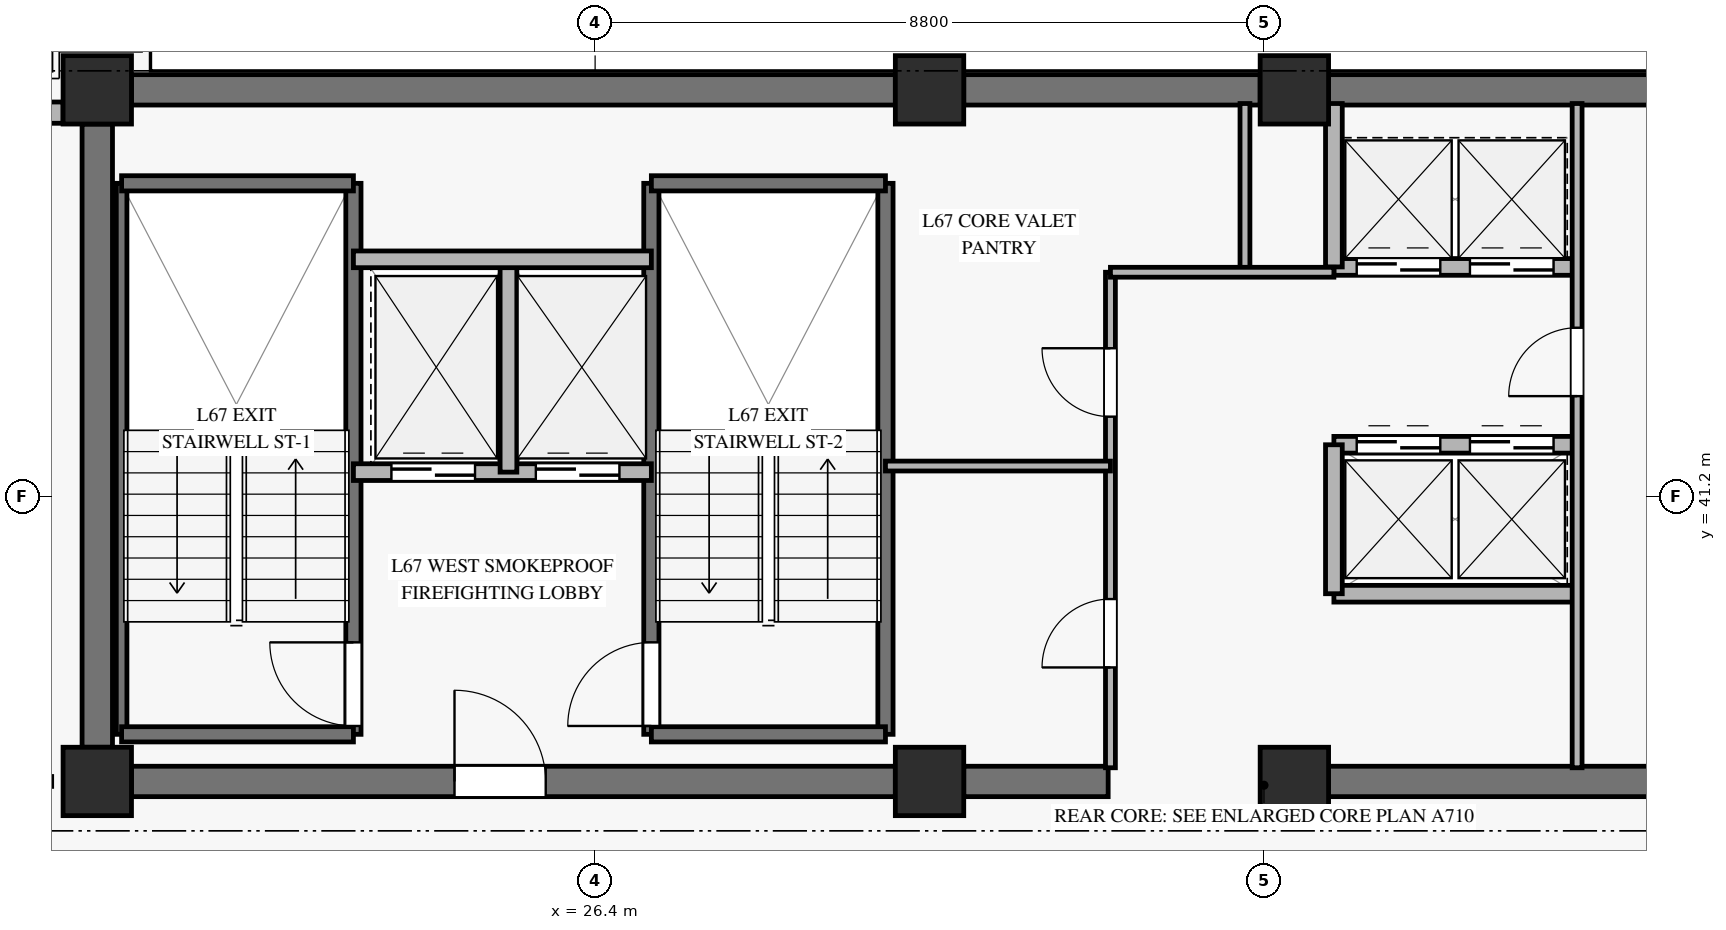
"""IFC4 building model, lengths in metres.
Left out: names, types, materials, properties, quantities, classifications, styles, units other than length and angle.
Written with IfcOpenShell. Run it as: python <this file> out.ifc"""

import sys

from ifc_helpers import new_model, si_unit, direction, frame, frame_2d, origin, origin_2d, place, context, subcontext, project, spatial, rectangle, extrude, source, transform, mapped, element, fill, save


model = new_model("IFC4")
c1 = context("Model", 3, precision=1e-05, world=origin(), true_north=direction((0.0, 1.0)))
c2 = subcontext(c1, "Body", "Model", "MODEL_VIEW")
j1 = project(units=[si_unit("LENGTHUNIT", "METRE"), si_unit("PLANEANGLEUNIT", "RADIAN")], contexts=[c1])
p1 = place(None, origin())
s1 = spatial("IfcSite", under=j1, at=p1, CompositionType="ELEMENT")
p2 = place(p1, origin())
s2 = spatial("IfcBuilding", under=s1, at=p2, CompositionType="ELEMENT")
p3 = place(p2, frame((0.0, 0.0, 262.1)))
s3 = spatial("IfcBuildingStorey", under=s2, at=p3, CompositionType="ELEMENT", Elevation=262.1)
m1 = source(origin(), c2, "Body", "SweptSolid", [
    extrude(rectangle(XDim=0.9, YDim=0.9, at=origin_2d()), origin(), (0.0, 0.0, 1.0), 3.185),
])
for number, where, z_axis, x_axis in (
    (1, (19.85, 37.45, 0.0), (0.0, 0.0, 1.0), (1.0, 0.0, 0.0)),
    (2, (19.85, 46.55, 0.0), (0.0, 0.0, 1.0), (1.0, 0.0, 0.0)),
    (3, (30.8, 37.45, 0.0), (0.0, 0.0, 1.0), (1.0, 0.0, 0.0)),
    (4, (30.8, 46.55, 0.0), (0.0, 0.0, 1.0), (1.0, 0.0, 0.0)),
    (5, (35.6, 37.45, 0.0), (0.0, 0.0, 1.0), (1.0, 0.0, 0.0)),
    (6, (35.6, 46.55, 0.0), (0.0, 0.0, 1.0), (1.0, 0.0, 0.0)),
):
    element("IfcColumn", number, at=place(p3, frame(where, z_axis=z_axis, x_axis=x_axis)), inside=s3, PredefinedType="PILASTER", context=c2, shape_type="MappedRepresentation", body=[
        mapped(m1, transform((0.0, 0.0, 0.0), x_axis=(1.0, 0.0, 0.0), y_axis=(0.0, 1.0, 0.0), z_axis=(0.0, 0.0, 1.0), scale=1.0)),
    ])
p4 = place(p3, frame((20.3, 46.55, 0.0), z_axis=(0.0, 0.0, 1.0), x_axis=(1.0, 0.0, 0.0)))
e7 = element("IfcWall", 7, at=p4, inside=s3, PredefinedType="SHEAR", context=c2, shape_type="SweptSolid", body=[
    extrude(rectangle(XDim=10.05, YDim=0.4, at=frame_2d((5.025, 0.0))), origin(), (0.0, 0.0, 1.0), 3.185),
])
p5 = place(p3, frame((31.25, 46.55, 0.0), z_axis=(0.0, 0.0, 1.0), x_axis=(1.0, 0.0, 0.0)))
e8 = element("IfcWall", 8, at=p5, inside=s3, PredefinedType="SHEAR", context=c2, shape_type="SweptSolid", body=[
    extrude(rectangle(XDim=3.9, YDim=0.4, at=frame_2d((1.95, 0.0))), origin(), (0.0, 0.0, 1.0), 3.185),
])
p6 = place(p3, frame((36.05, 46.55, 0.0), z_axis=(0.0, 0.0, 1.0), x_axis=(1.0, 0.0, 0.0)))
e9 = element("IfcWall", 9, at=p6, inside=s3, PredefinedType="SHEAR", context=c2, shape_type="SweptSolid", body=[
    extrude(rectangle(XDim=7.8, YDim=0.4, at=frame_2d((3.9, 0.0))), origin(), (0.0, 0.0, 1.0), 3.185),
])
p7 = place(p3, frame((20.3, 37.45, 0.0), z_axis=(0.0, 0.0, 1.0), x_axis=(1.0, 0.0, 0.0)))
e10 = element("IfcWall", 10, at=p7, inside=s3, PredefinedType="SHEAR", context=c2, shape_type="SweptSolid", body=[
    extrude(rectangle(XDim=10.05, YDim=0.4, at=frame_2d((5.025, 0.0))), origin(), (0.0, 0.0, 1.0), 3.185),
])
p8 = place(p7, frame((4.25, 0.0, 0.0)))
e11 = element("IfcOpeningElement", 11, at=p8, cuts=e10, PredefinedType="OPENING", context=c2, shape_type="SweptSolid", body=[
    extrude(rectangle(XDim=1.2, YDim=2.15, at=frame_2d((0.6, 1.075))), frame((0.0, 0.21, 0.0), z_axis=(0.0, -1.0, 0.0), x_axis=(1.0, 0.0, 0.0)), (0.0, 0.0, 1.0), 0.42),
])
p9 = place(p3, frame((31.25, 37.45, 0.0), z_axis=(0.0, 0.0, 1.0), x_axis=(1.0, 0.0, 0.0)))
e12 = element("IfcWall", 12, at=p9, inside=s3, PredefinedType="SHEAR", context=c2, shape_type="SweptSolid", body=[
    extrude(rectangle(XDim=1.9, YDim=0.4, at=frame_2d((0.95, 0.0))), origin(), (0.0, 0.0, 1.0), 3.185),
])
p10 = place(p3, frame((36.05, 37.45, 0.0), z_axis=(0.0, 0.0, 1.0), x_axis=(1.0, 0.0, 0.0)))
e13 = element("IfcWall", 13, at=p10, inside=s3, PredefinedType="SHEAR", context=c2, shape_type="SweptSolid", body=[
    extrude(rectangle(XDim=7.8, YDim=0.4, at=frame_2d((3.9, 0.0))), origin(), (0.0, 0.0, 1.0), 3.185),
])
p11 = place(p3, frame((19.85, 37.9, 0.0), z_axis=(0.0, 0.0, 1.0), x_axis=(0.0, 1.0, 0.0)))
e14 = element("IfcWall", 14, at=p11, inside=s3, PredefinedType="SHEAR", context=c2, shape_type="SweptSolid", body=[
    extrude(rectangle(XDim=8.2, YDim=0.4, at=frame_2d((4.1, 0.0))), origin(), (0.0, 0.0, 1.0), 3.185),
])
p12 = place(p3, frame((11.598, 46.25, 0.0), z_axis=(0.0, 0.0, 1.0), x_axis=(1.0, 0.0, 0.0)))
e15 = element("IfcWall", 15, at=p12, inside=s3, PredefinedType="SOLIDWALL", context=c2, shape_type="SweptSolid", body=[
    extrude(rectangle(XDim=7.802, YDim=0.28, at=frame_2d((3.901, 0.0))), origin(), (0.0, 0.0, 1.0), 2.815),
])
p13 = place(p12, frame((3.101, 0.0, 0.45)))
e16 = element("IfcOpeningElement", 16, at=p13, cuts=e15, PredefinedType="OPENING", context=c2, shape_type="SweptSolid", body=[
    extrude(rectangle(XDim=1.6, YDim=2.0, at=frame_2d((0.8, 1.0))), frame((0.0, 0.15, 0.0), z_axis=(0.0, -1.0, 0.0), x_axis=(1.0, 0.0, 0.0)), (0.0, 0.0, 1.0), 0.3),
])
p14 = place(p3, frame((20.17, 38.07, 0.0), z_axis=(0.0, 0.0, 1.0), x_axis=(0.0, 1.0, 0.0)))
e17 = element("IfcWall", 17, at=p14, inside=s3, PredefinedType="SOLIDWALL", context=c2, shape_type="SweptSolid", body=[
    extrude(rectangle(XDim=7.25, YDim=0.14, at=frame_2d((3.625, 0.0))), origin(), (0.0, 0.0, 1.0), 3.4),
])
p15 = place(p3, frame((23.22, 38.07, 0.0), z_axis=(0.0, 0.0, 1.0), x_axis=(0.0, 1.0, 0.0)))
e18 = element("IfcWall", 18, at=p15, inside=s3, PredefinedType="SOLIDWALL", context=c2, shape_type="SweptSolid", body=[
    extrude(rectangle(XDim=7.25, YDim=0.2, at=frame_2d((3.625, 0.0))), origin(), (0.0, 0.0, 1.0), 3.4),
])
p16 = place(p15, frame((0.11, 0.0, 0.0)))
e19 = element("IfcOpeningElement", 19, at=p16, cuts=e18, PredefinedType="OPENING", context=c2, shape_type="SweptSolid", body=[
    extrude(rectangle(XDim=1.1, YDim=2.15, at=frame_2d((0.55, 1.075))), frame((0.0, 0.11, 0.0), z_axis=(0.0, -1.0, 0.0), x_axis=(1.0, 0.0, 0.0)), (0.0, 0.0, 1.0), 0.22),
])
for number, where, z_axis, x_axis in (
    (20, (20.17, 45.32, 0.0), (0.0, 0.0, 1.0), (1.0, 0.0, 0.0)),
    (21, (20.17, 38.07, 0.0), (0.0, 0.0, 1.0), (1.0, 0.0, 0.0)),
):
    element("IfcWall", number, at=place(p3, frame(where, z_axis=z_axis, x_axis=x_axis)), inside=s3, PredefinedType="SOLIDWALL", context=c2, shape_type="SweptSolid", body=[
        extrude(rectangle(XDim=3.05, YDim=0.2, at=frame_2d((1.525, 0.0))), origin(), (0.0, 0.0, 1.0), 3.4),
    ])
p17 = place(p3, frame((27.14, 38.07, 0.0), z_axis=(0.0, 0.0, 1.0), x_axis=(0.0, 1.0, 0.0)))
e22 = element("IfcWall", 22, at=p17, inside=s3, PredefinedType="SOLIDWALL", context=c2, shape_type="SweptSolid", body=[
    extrude(rectangle(XDim=7.25, YDim=0.2, at=frame_2d((3.625, 0.0))), origin(), (0.0, 0.0, 1.0), 3.4),
])
p18 = place(p17, frame((0.11, 0.0, 0.0)))
e23 = element("IfcOpeningElement", 23, at=p18, cuts=e22, PredefinedType="OPENING", context=c2, shape_type="SweptSolid", body=[
    extrude(rectangle(XDim=1.1, YDim=2.15, at=frame_2d((0.55, 1.075))), frame((0.0, 0.11, 0.0), z_axis=(0.0, -1.0, 0.0), x_axis=(1.0, 0.0, 0.0)), (0.0, 0.0, 1.0), 0.22),
])
p19 = place(p3, frame((30.22, 38.07, 0.0), z_axis=(0.0, 0.0, 1.0), x_axis=(0.0, 1.0, 0.0)))
e24 = element("IfcWall", 24, at=p19, inside=s3, PredefinedType="SOLIDWALL", context=c2, shape_type="SweptSolid", body=[
    extrude(rectangle(XDim=7.25, YDim=0.2, at=frame_2d((3.625, 0.0))), origin(), (0.0, 0.0, 1.0), 3.4),
])
for number, where, z_axis, x_axis in (
    (25, (27.14, 45.32, 0.0), (0.0, 0.0, 1.0), (1.0, 0.0, 0.0)),
    (26, (27.14, 38.07, 0.0), (0.0, 0.0, 1.0), (1.0, 0.0, 0.0)),
):
    element("IfcWall", number, at=place(p3, frame(where, z_axis=z_axis, x_axis=x_axis)), inside=s3, PredefinedType="SOLIDWALL", context=c2, shape_type="SweptSolid", body=[
        extrude(rectangle(XDim=3.08, YDim=0.2, at=frame_2d((1.54, 0.0))), origin(), (0.0, 0.0, 1.0), 3.4),
    ])
p20 = place(p3, frame((23.22, 41.52, 0.0), z_axis=(0.0, 0.0, 1.0), x_axis=(1.0, 0.0, 0.0)))
e27 = element("IfcWall", 27, at=p20, inside=s3, PredefinedType="SOLIDWALL", context=c2, shape_type="SweptSolid", body=[
    extrude(rectangle(XDim=3.92, YDim=0.22, at=frame_2d((1.96, 0.0))), origin(), (0.0, 0.0, 1.0), 3.185),
])
p21 = place(p20, frame((0.5, 0.0, 0.0)))
e28 = element("IfcOpeningElement", 28, at=p21, cuts=e27, PredefinedType="OPENING", context=c2, shape_type="SweptSolid", body=[
    extrude(rectangle(XDim=1.1, YDim=2.2, at=frame_2d((0.55, 1.1))), frame((0.0, 0.12, 0.0), z_axis=(0.0, -1.0, 0.0), x_axis=(1.0, 0.0, 0.0)), (0.0, 0.0, 1.0), 0.24),
])
p22 = place(p20, frame((2.4, 0.0, 0.0)))
e29 = element("IfcOpeningElement", 29, at=p22, cuts=e27, PredefinedType="OPENING", context=c2, shape_type="SweptSolid", body=[
    extrude(rectangle(XDim=1.1, YDim=2.2, at=frame_2d((0.55, 1.1))), frame((0.0, 0.12, 0.0), z_axis=(0.0, -1.0, 0.0), x_axis=(1.0, 0.0, 0.0)), (0.0, 0.0, 1.0), 0.24),
])
p23 = place(p3, frame((25.26, 41.52, 0.0), z_axis=(0.0, 0.0, 1.0), x_axis=(0.0, 1.0, 0.0)))
e30 = element("IfcWall", 30, at=p23, inside=s3, PredefinedType="SOLIDWALL", context=c2, shape_type="SweptSolid", body=[
    extrude(rectangle(XDim=2.8, YDim=0.22, at=frame_2d((1.4, 0.0))), origin(), (0.0, 0.0, 1.0), 3.185),
])
p24 = place(p3, frame((23.22, 44.32, 0.0), z_axis=(0.0, 0.0, 1.0), x_axis=(1.0, 0.0, 0.0)))
e31 = element("IfcWall", 31, at=p24, inside=s3, PredefinedType="SOLIDWALL", context=c2, shape_type="SweptSolid", body=[
    extrude(rectangle(XDim=3.92, YDim=0.22, at=frame_2d((1.96, 0.0))), origin(), (0.0, 0.0, 1.0), 3.185),
])
p25 = place(p3, frame((36.12, 44.22, 0.0), z_axis=(0.0, 0.0, 1.0), x_axis=(1.0, 0.0, 0.0)))
e32 = element("IfcWall", 32, at=p25, inside=s3, PredefinedType="SOLIDWALL", context=c2, shape_type="SweptSolid", body=[
    extrude(rectangle(XDim=3.2, YDim=0.22, at=frame_2d((1.6, 0.0))), origin(), (0.0, 0.0, 1.0), 3.185),
])
p26 = place(p25, frame((0.3, 0.0, 0.0)))
e33 = element("IfcOpeningElement", 33, at=p26, cuts=e32, PredefinedType="OPENING", context=c2, shape_type="SweptSolid", body=[
    extrude(rectangle(XDim=1.1, YDim=2.2, at=frame_2d((0.55, 1.1))), frame((0.0, 0.12, 0.0), z_axis=(0.0, -1.0, 0.0), x_axis=(1.0, 0.0, 0.0)), (0.0, 0.0, 1.0), 0.24),
])
p27 = place(p25, frame((1.79, 0.0, 0.0)))
e34 = element("IfcOpeningElement", 34, at=p27, cuts=e32, PredefinedType="OPENING", context=c2, shape_type="SweptSolid", body=[
    extrude(rectangle(XDim=1.1, YDim=2.2, at=frame_2d((0.55, 1.1))), frame((0.0, 0.12, 0.0), z_axis=(0.0, -1.0, 0.0), x_axis=(1.0, 0.0, 0.0)), (0.0, 0.0, 1.0), 0.24),
])
p28 = place(p3, frame((36.12, 41.88, 0.0), z_axis=(0.0, 0.0, 1.0), x_axis=(1.0, 0.0, 0.0)))
e35 = element("IfcWall", 35, at=p28, inside=s3, PredefinedType="SOLIDWALL", context=c2, shape_type="SweptSolid", body=[
    extrude(rectangle(XDim=3.2, YDim=0.22, at=frame_2d((1.6, 0.0))), origin(), (0.0, 0.0, 1.0), 3.185),
])
p29 = place(p28, frame((0.3, 0.0, 0.0)))
e36 = element("IfcOpeningElement", 36, at=p29, cuts=e35, PredefinedType="OPENING", context=c2, shape_type="SweptSolid", body=[
    extrude(rectangle(XDim=1.1, YDim=2.2, at=frame_2d((0.55, 1.1))), frame((0.0, 0.12, 0.0), z_axis=(0.0, -1.0, 0.0), x_axis=(1.0, 0.0, 0.0)), (0.0, 0.0, 1.0), 0.24),
])
p30 = place(p28, frame((1.79, 0.0, 0.0)))
e37 = element("IfcOpeningElement", 37, at=p30, cuts=e35, PredefinedType="OPENING", context=c2, shape_type="SweptSolid", body=[
    extrude(rectangle(XDim=1.1, YDim=2.2, at=frame_2d((0.55, 1.1))), frame((0.0, 0.12, 0.0), z_axis=(0.0, -1.0, 0.0), x_axis=(1.0, 0.0, 0.0)), (0.0, 0.0, 1.0), 0.24),
])
p31 = place(p3, frame((36.12, 39.92, 0.0), z_axis=(0.0, 0.0, 1.0), x_axis=(1.0, 0.0, 0.0)))
e38 = element("IfcWall", 38, at=p31, inside=s3, PredefinedType="SOLIDWALL", context=c2, shape_type="SweptSolid", body=[
    extrude(rectangle(XDim=3.2, YDim=0.22, at=frame_2d((1.6, 0.0))), origin(), (0.0, 0.0, 1.0), 3.185),
])
p32 = place(p3, frame((36.12, 39.92, 0.0), z_axis=(0.0, 0.0, 1.0), x_axis=(0.0, 1.0, 0.0)))
e39 = element("IfcWall", 39, at=p32, inside=s3, PredefinedType="SOLIDWALL", context=c2, shape_type="SweptSolid", body=[
    extrude(rectangle(XDim=1.96, YDim=0.22, at=frame_2d((0.98, 0.0))), origin(), (0.0, 0.0, 1.0), 3.185),
])
p33 = place(p3, frame((36.12, 44.22, 0.0), z_axis=(0.0, 0.0, 1.0), x_axis=(0.0, 1.0, 0.0)))
e40 = element("IfcWall", 40, at=p33, inside=s3, PredefinedType="SOLIDWALL", context=c2, shape_type="SweptSolid", body=[
    extrude(rectangle(XDim=2.15, YDim=0.22, at=frame_2d((1.075, 0.0))), origin(), (0.0, 0.0, 1.0), 3.185),
])
p34 = place(p3, frame((33.18, 37.63, 0.0), z_axis=(0.0, 0.0, 1.0), x_axis=(0.0, 1.0, 0.0)))
e41 = element("IfcWall", 41, at=p34, inside=s3, PredefinedType="PARTITIONING", context=c2, shape_type="SweptSolid", body=[
    extrude(rectangle(XDim=6.52, YDim=0.13, at=frame_2d((3.26, 0.0))), origin(), (0.0, 0.0, 1.0), 2.27),
])
p35 = place(p34, frame((1.32, 0.0, 0.0)))
e42 = element("IfcOpeningElement", 42, at=p35, cuts=e41, PredefinedType="OPENING", context=c2, shape_type="SweptSolid", body=[
    extrude(rectangle(XDim=0.9, YDim=2.1, at=frame_2d((0.45, 1.05))), frame((0.0, 0.075, 0.0), z_axis=(0.0, -1.0, 0.0), x_axis=(1.0, 0.0, 0.0)), (0.0, 0.0, 1.0), 0.15),
])
p36 = place(p34, frame((4.62, 0.0, 0.0)))
e43 = element("IfcOpeningElement", 43, at=p36, cuts=e41, PredefinedType="OPENING", context=c2, shape_type="SweptSolid", body=[
    extrude(rectangle(XDim=0.9, YDim=2.1, at=frame_2d((0.45, 1.05))), frame((0.0, 0.075, 0.0), z_axis=(0.0, -1.0, 0.0), x_axis=(1.0, 0.0, 0.0)), (0.0, 0.0, 1.0), 0.15),
])
p37 = place(p3, frame((34.95, 44.15, 0.0), z_axis=(0.0, 0.0, 1.0), x_axis=(0.0, 1.0, 0.0)))
e44 = element("IfcWall", 44, at=p37, inside=s3, PredefinedType="PARTITIONING", context=c2, shape_type="SweptSolid", body=[
    extrude(rectangle(XDim=2.22, YDim=0.13, at=frame_2d((1.11, 0.0))), origin(), (0.0, 0.0, 1.0), 3.185),
])
p38 = place(p3, frame((33.18, 44.15, 0.0), z_axis=(0.0, 0.0, 1.0), x_axis=(1.0, 0.0, 0.0)))
e45 = element("IfcWall", 45, at=p38, inside=s3, PredefinedType="PARTITIONING", context=c2, shape_type="SweptSolid", body=[
    extrude(rectangle(XDim=2.94, YDim=0.13, at=frame_2d((1.47, 0.0))), origin(), (0.0, 0.0, 1.0), 2.47),
])
p39 = place(p3, frame((39.32, 37.63, 0.0), z_axis=(0.0, 0.0, 1.0), x_axis=(0.0, 1.0, 0.0)))
e46 = element("IfcWall", 46, at=p39, inside=s3, PredefinedType="PARTITIONING", context=c2, shape_type="SweptSolid", body=[
    extrude(rectangle(XDim=8.74, YDim=0.13, at=frame_2d((4.37, 0.0))), origin(), (0.0, 0.0, 1.0), 3.185),
])
p40 = place(p39, frame((4.89, 0.0, 0.0)))
e47 = element("IfcOpeningElement", 47, at=p40, cuts=e46, PredefinedType="OPENING", context=c2, shape_type="SweptSolid", body=[
    extrude(rectangle(XDim=0.9, YDim=2.1, at=frame_2d((0.45, 1.05))), frame((0.0, 0.075, 0.0), z_axis=(0.0, -1.0, 0.0), x_axis=(1.0, 0.0, 0.0)), (0.0, 0.0, 1.0), 0.15),
])
p41 = place(p3, frame((30.22, 41.6, 0.0), z_axis=(0.0, 0.0, 1.0), x_axis=(1.0, 0.0, 0.0)))
e48 = element("IfcWall", 48, at=p41, inside=s3, PredefinedType="PARTITIONING", context=c2, shape_type="SweptSolid", body=[
    extrude(rectangle(XDim=2.96, YDim=0.13, at=frame_2d((1.48, 0.0))), origin(), (0.0, 0.0, 1.0), 2.47),
])
m2 = source(origin(), c2, "Body", "SweptSolid", [
    extrude(rectangle(XDim=1.1, YDim=2.15, at=frame_2d((0.55, 1.075))), frame((0.0, 0.025, 0.0), z_axis=(0.0, -1.0, 0.0), x_axis=(1.0, 0.0, 0.0)), (0.0, 0.0, 1.0), 0.05),
])
p42 = place(p16, origin())
e49 = element("IfcDoor", 49, at=p42, inside=s3, OperationType="SINGLE_SWING_RIGHT", PredefinedType="DOOR", context=c2, shape_type="MappedRepresentation", body=[
    mapped(m2, transform((0.0, 0.0, 0.0), x_axis=(1.0, 0.0, 0.0), y_axis=(0.0, 1.0, 0.0), z_axis=(0.0, 0.0, 1.0), scale=1.0)),
])
fill(e19, e49)
p43 = place(p18, origin())
e50 = element("IfcDoor", 50, at=p43, inside=s3, OperationType="SINGLE_SWING_LEFT", PredefinedType="DOOR", context=c2, shape_type="MappedRepresentation", body=[
    mapped(m2, transform((0.0, 0.0, 0.0), x_axis=(1.0, 0.0, 0.0), y_axis=(0.0, 1.0, 0.0), z_axis=(0.0, 0.0, 1.0), scale=1.0)),
])
fill(e23, e50)
m3 = source(origin(), c2, "Body", "SweptSolid", [
    extrude(rectangle(XDim=1.1, YDim=2.2, at=frame_2d((0.55, 1.1))), frame((0.0, 0.025, 0.0), z_axis=(0.0, -1.0, 0.0), x_axis=(1.0, 0.0, 0.0)), (0.0, 0.0, 1.0), 0.05),
])
p44 = place(p21, origin())
e51 = element("IfcDoor", 51, at=p44, inside=s3, OperationType="SLIDING_TO_LEFT", PredefinedType="DOOR", context=c2, shape_type="MappedRepresentation", body=[
    mapped(m3, transform((0.0, 0.0, 0.0), x_axis=(1.0, 0.0, 0.0), y_axis=(0.0, 1.0, 0.0), z_axis=(0.0, 0.0, 1.0), scale=1.0)),
])
fill(e28, e51)
p45 = place(p22, origin())
e52 = element("IfcDoor", 52, at=p45, inside=s3, OperationType="SLIDING_TO_LEFT", PredefinedType="DOOR", context=c2, shape_type="MappedRepresentation", body=[
    mapped(m3, transform((0.0, 0.0, 0.0), x_axis=(1.0, 0.0, 0.0), y_axis=(0.0, 1.0, 0.0), z_axis=(0.0, 0.0, 1.0), scale=1.0)),
])
fill(e29, e52)
m4 = source(origin(), c2, "Body", "SweptSolid", [
    extrude(rectangle(XDim=1.2, YDim=2.15, at=frame_2d((0.6, 1.075))), frame((0.0, 0.025, 0.0), z_axis=(0.0, -1.0, 0.0), x_axis=(1.0, 0.0, 0.0)), (0.0, 0.0, 1.0), 0.05),
])
p46 = place(p8, origin())
e53 = element("IfcDoor", 53, at=p46, inside=s3, OperationType="SINGLE_SWING_LEFT", PredefinedType="DOOR", context=c2, shape_type="MappedRepresentation", body=[
    mapped(m4, transform((0.0, 0.0, 0.0), x_axis=(1.0, 0.0, 0.0), y_axis=(0.0, 1.0, 0.0), z_axis=(0.0, 0.0, 1.0), scale=1.0)),
])
fill(e11, e53)
p47 = place(p26, origin())
e54 = element("IfcDoor", 54, at=p47, inside=s3, OperationType="SLIDING_TO_LEFT", PredefinedType="DOOR", context=c2, shape_type="MappedRepresentation", body=[
    mapped(m3, transform((0.0, 0.0, 0.0), x_axis=(1.0, 0.0, 0.0), y_axis=(0.0, 1.0, 0.0), z_axis=(0.0, 0.0, 1.0), scale=1.0)),
])
fill(e33, e54)
p48 = place(p27, origin())
e55 = element("IfcDoor", 55, at=p48, inside=s3, OperationType="SLIDING_TO_LEFT", PredefinedType="DOOR", context=c2, shape_type="MappedRepresentation", body=[
    mapped(m3, transform((0.0, 0.0, 0.0), x_axis=(1.0, 0.0, 0.0), y_axis=(0.0, 1.0, 0.0), z_axis=(0.0, 0.0, 1.0), scale=1.0)),
])
fill(e34, e55)
p49 = place(p29, origin())
e56 = element("IfcDoor", 56, at=p49, inside=s3, OperationType="SLIDING_TO_LEFT", PredefinedType="DOOR", context=c2, shape_type="MappedRepresentation", body=[
    mapped(m3, transform((0.0, 0.0, 0.0), x_axis=(1.0, 0.0, 0.0), y_axis=(0.0, 1.0, 0.0), z_axis=(0.0, 0.0, 1.0), scale=1.0)),
])
fill(e36, e56)
p50 = place(p30, origin())
e57 = element("IfcDoor", 57, at=p50, inside=s3, OperationType="SLIDING_TO_LEFT", PredefinedType="DOOR", context=c2, shape_type="MappedRepresentation", body=[
    mapped(m3, transform((0.0, 0.0, 0.0), x_axis=(1.0, 0.0, 0.0), y_axis=(0.0, 1.0, 0.0), z_axis=(0.0, 0.0, 1.0), scale=1.0)),
])
fill(e37, e57)
m5 = source(origin(), c2, "Body", "SweptSolid", [
    extrude(rectangle(XDim=0.9, YDim=2.1, at=frame_2d((0.45, 1.05))), frame((0.0, 0.025, 0.0), z_axis=(0.0, -1.0, 0.0), x_axis=(1.0, 0.0, 0.0)), (0.0, 0.0, 1.0), 0.05),
])
p51 = place(p35, origin())
e58 = element("IfcDoor", 58, at=p51, inside=s3, OperationType="SINGLE_SWING_LEFT", PredefinedType="DOOR", context=c2, shape_type="MappedRepresentation", body=[
    mapped(m5, transform((0.0, 0.0, 0.0), x_axis=(1.0, 0.0, 0.0), y_axis=(0.0, 1.0, 0.0), z_axis=(0.0, 0.0, 1.0), scale=1.0)),
])
fill(e42, e58)
p52 = place(p36, origin())
e59 = element("IfcDoor", 59, at=p52, inside=s3, OperationType="SINGLE_SWING_RIGHT", PredefinedType="DOOR", context=c2, shape_type="MappedRepresentation", body=[
    mapped(m5, transform((0.0, 0.0, 0.0), x_axis=(1.0, 0.0, 0.0), y_axis=(0.0, 1.0, 0.0), z_axis=(0.0, 0.0, 1.0), scale=1.0)),
])
fill(e43, e59)
p53 = place(p40, origin())
e60 = element("IfcDoor", 60, at=p53, inside=s3, OperationType="SINGLE_SWING_LEFT", PredefinedType="DOOR", context=c2, shape_type="MappedRepresentation", body=[
    mapped(m5, transform((0.0, 0.0, 0.0), x_axis=(1.0, 0.0, 0.0), y_axis=(0.0, 1.0, 0.0), z_axis=(0.0, 0.0, 1.0), scale=1.0)),
])
fill(e47, e60)
save(model, sys.argv[1])
